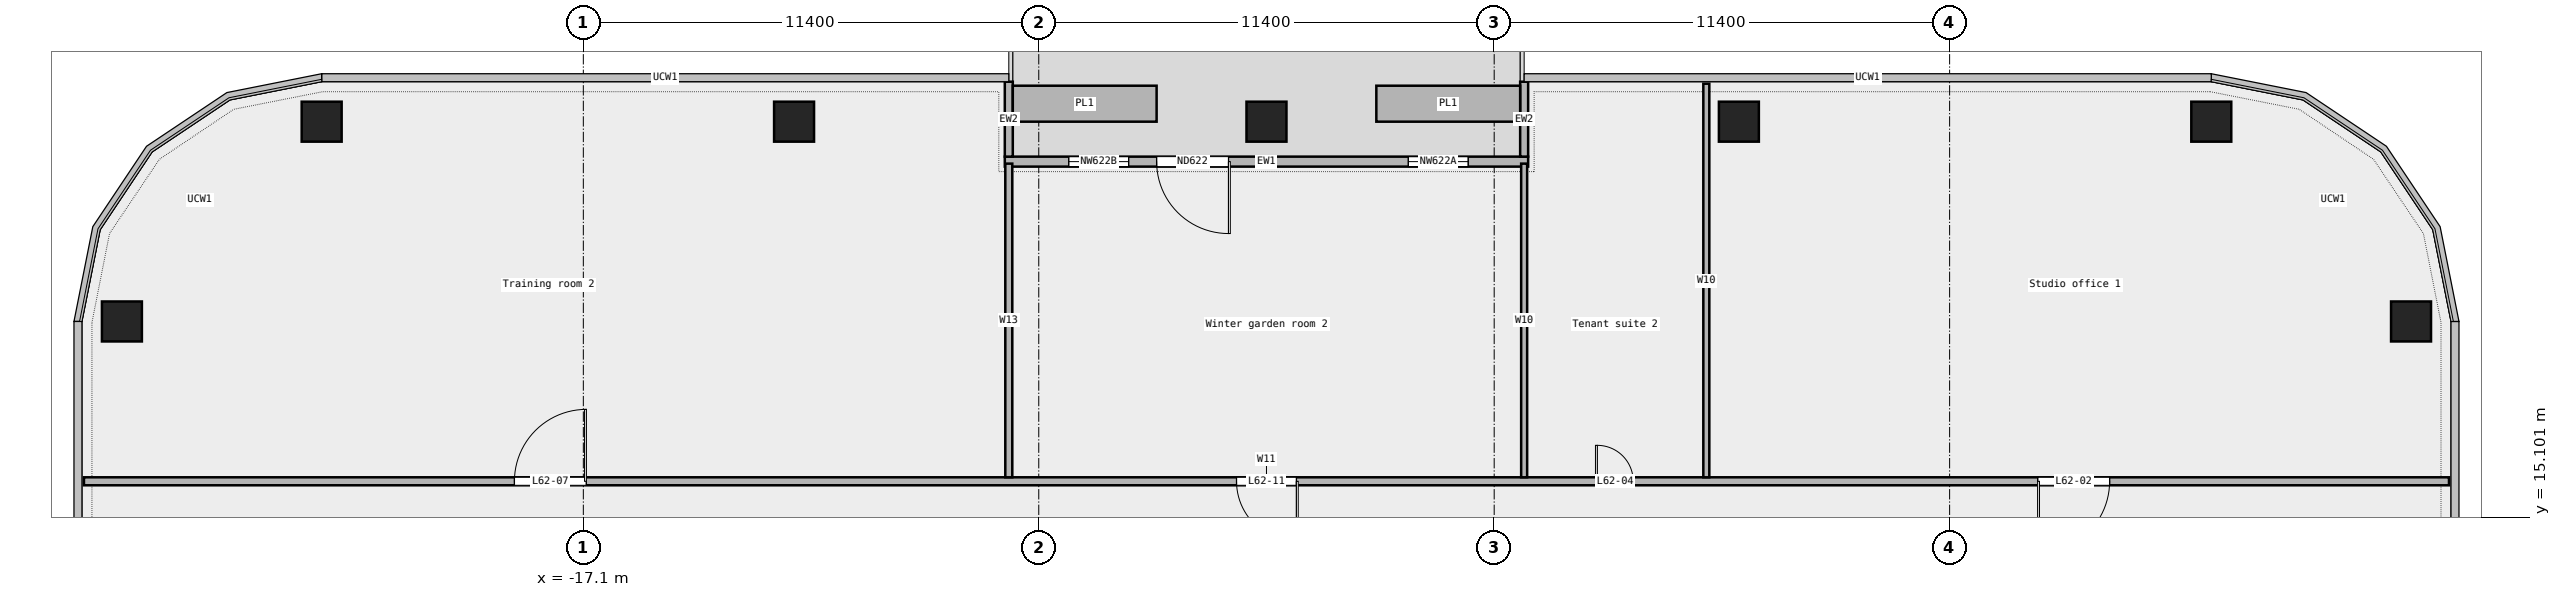
"""IFC4 building model, lengths in metres.
Left out: names, types, materials, properties, quantities, classifications, styles, units other than length and angle.
Written with IfcOpenShell. Run it as: python <this file> out.ifc"""

import sys

from ifc_helpers import new_model, si_unit, direction, frame, frame_2d, origin, origin_2d, place, context, subcontext, project, spatial, rectangle, extrude, element, fill, save


model = new_model("IFC4")
c1 = context("Model", 3, precision=1e-05, world=origin(), true_north=direction((0.0, 1.0)))
c2 = subcontext(c1, "Body", "Model", "MODEL_VIEW")
j1 = project(units=[si_unit("LENGTHUNIT", "METRE"), si_unit("PLANEANGLEUNIT", "RADIAN")], contexts=[c1])
p1 = place(None, origin())
s1 = spatial("IfcSite", under=j1, at=p1, CompositionType="ELEMENT")
p2 = place(p1, origin())
s2 = spatial("IfcBuilding", under=s1, at=p2, CompositionType="ELEMENT")
p3 = place(p2, frame((0.0, 0.0, 287.4)))
s3 = spatial("IfcBuildingStorey", under=s2, at=p3, CompositionType="ELEMENT", Elevation=287.4)
for number, where, z_axis, x_axis in (
    (1, (28.65, 20.0, 0.0), (0.0, 0.0, 1.0), (1.0, 0.0, 0.0)),
    (2, (23.65, 25.0, 0.0), (0.0, 0.0, 1.0), (1.0, 0.0, 0.0)),
    (3, (11.825, 25.0, 0.0), (0.0, 0.0, 1.0), (1.0, 0.0, 0.0)),
    (4, (0.0, 25.0, 0.0), (0.0, 0.0, 1.0), (1.0, 0.0, 0.0)),
    (5, (-11.825, 25.0, 0.0), (0.0, 0.0, 1.0), (1.0, 0.0, 0.0)),
    (6, (-23.65, 25.0, 0.0), (0.0, 0.0, 1.0), (1.0, 0.0, 0.0)),
    (7, (-28.65, 20.0, 0.0), (0.0, 0.0, 1.0), (1.0, 0.0, 0.0)),
):
    element("IfcColumn", number, at=place(p3, frame(where, z_axis=z_axis, x_axis=x_axis)), inside=s3, PredefinedType="COLUMN", context=c2, shape_type="SweptSolid", body=[
        extrude(rectangle(XDim=1.0, YDim=1.0, at=origin_2d()), origin(), (0.0, 0.0, 1.0), 3.6),
    ])
p4 = place(p3, frame((6.55, 24.0, 0.0), z_axis=(0.0, 0.0, 1.0), x_axis=(-1.0, 0.0, 0.0)))
e8 = element("IfcWall", 8, at=p4, inside=s3, PredefinedType="STANDARD", context=c2, shape_type="SweptSolid", body=[
    extrude(rectangle(XDim=13.1, YDim=0.25, at=frame_2d((6.55, 0.0))), origin(), (0.0, 0.0, 1.0), 3.6),
])
p5 = place(p4, frame((1.5, 0.0, 0.45)))
e9 = element("IfcOpeningElement", 9, at=p5, cuts=e8, PredefinedType="OPENING", context=c2, shape_type="SweptSolid", body=[
    extrude(rectangle(XDim=1.5, YDim=2.4, at=frame_2d((0.75, 1.2))), frame((0.0, 0.137, 0.0), z_axis=(0.0, -1.0, 0.0), x_axis=(1.0, 0.0, 0.0)), (0.0, 0.0, 1.0), 0.274),
])
p6 = place(p4, frame((7.5, 0.0, 0.0)))
e10 = element("IfcOpeningElement", 10, at=p6, cuts=e8, PredefinedType="OPENING", context=c2, shape_type="SweptSolid", body=[
    extrude(rectangle(XDim=1.8, YDim=2.4, at=frame_2d((0.9, 1.2))), frame((0.0, 0.137, 0.0), z_axis=(0.0, -1.0, 0.0), x_axis=(1.0, 0.0, 0.0)), (0.0, 0.0, 1.0), 0.274),
])
p7 = place(p4, frame((10.0, 0.0, 0.45)))
e11 = element("IfcOpeningElement", 11, at=p7, cuts=e8, PredefinedType="OPENING", context=c2, shape_type="SweptSolid", body=[
    extrude(rectangle(XDim=1.5, YDim=2.4, at=frame_2d((0.75, 1.2))), frame((0.0, 0.137, 0.0), z_axis=(0.0, -1.0, 0.0), x_axis=(1.0, 0.0, 0.0)), (0.0, 0.0, 1.0), 0.274),
])
for number, where, z_axis, x_axis in (
    (12, (6.45, 26.0, 0.0), (0.0, 0.0, 1.0), (0.0, -1.0, 0.0)),
    (13, (-6.45, 26.0, 0.0), (0.0, 0.0, 1.0), (0.0, -1.0, 0.0)),
):
    element("IfcWall", number, at=place(p3, frame(where, z_axis=z_axis, x_axis=x_axis)), inside=s3, PredefinedType="STANDARD", context=c2, shape_type="SweptSolid", body=[
        extrude(rectangle(XDim=1.875, YDim=0.2, at=frame_2d((0.938, 0.0))), origin(), (0.0, 0.0, 1.0), 3.6),
    ])
for number, where, z_axis, x_axis in (
    (14, (6.35, 25.45, 0.0), (0.0, 0.0, 1.0), (-1.0, 0.0, 0.0)),
    (15, (-2.75, 25.45, 0.0), (0.0, 0.0, 1.0), (-1.0, 0.0, 0.0)),
):
    element("IfcWall", number, at=place(p3, frame(where, z_axis=z_axis, x_axis=x_axis)), inside=s3, PredefinedType="STANDARD", context=c2, shape_type="SweptSolid", body=[
        extrude(rectangle(XDim=3.6, YDim=0.9, at=frame_2d((1.8, 0.0))), origin(), (0.0, 0.0, 1.0), 0.7),
    ])
p8 = place(p3, frame((-29.6, 16.0, 0.0), z_axis=(0.0, 0.0, 1.0), x_axis=(1.0, 0.0, 0.0)))
e16 = element("IfcWall", 16, at=p8, inside=s3, PredefinedType="PARTITIONING", context=c2, shape_type="SweptSolid", body=[
    extrude(rectangle(XDim=59.2, YDim=0.2, at=frame_2d((29.6, 0.0))), origin(), (0.0, 0.0, 1.0), 3.6),
])
p9 = place(p8, frame((48.905, 0.0, 0.0)))
e17 = element("IfcOpeningElement", 17, at=p9, cuts=e16, PredefinedType="OPENING", context=c2, shape_type="SweptSolid", body=[
    extrude(rectangle(XDim=1.8, YDim=2.1, at=frame_2d((0.9, 1.05))), frame((0.0, 0.112, 0.0), z_axis=(0.0, -1.0, 0.0), x_axis=(1.0, 0.0, 0.0)), (0.0, 0.0, 1.0), 0.224),
])
p10 = place(p8, frame((37.88, 0.0, 0.0)))
e18 = element("IfcOpeningElement", 18, at=p10, cuts=e16, PredefinedType="OPENING", context=c2, shape_type="SweptSolid", body=[
    extrude(rectangle(XDim=0.9, YDim=2.1, at=frame_2d((0.45, 1.05))), frame((0.0, 0.112, 0.0), z_axis=(0.0, -1.0, 0.0), x_axis=(1.0, 0.0, 0.0)), (0.0, 0.0, 1.0), 0.224),
])
p11 = place(p8, frame((10.775, 0.0, 0.0)))
e19 = element("IfcOpeningElement", 19, at=p11, cuts=e16, PredefinedType="OPENING", context=c2, shape_type="SweptSolid", body=[
    extrude(rectangle(XDim=1.8, YDim=2.1, at=frame_2d((0.9, 1.05))), frame((0.0, 0.112, 0.0), z_axis=(0.0, -1.0, 0.0), x_axis=(1.0, 0.0, 0.0)), (0.0, 0.0, 1.0), 0.224),
])
p12 = place(p8, frame((28.85, 0.0, 0.0)))
e20 = element("IfcOpeningElement", 20, at=p12, cuts=e16, PredefinedType="OPENING", context=c2, shape_type="SweptSolid", body=[
    extrude(rectangle(XDim=1.5, YDim=2.1, at=frame_2d((0.75, 1.05))), frame((0.0, 0.112, 0.0), z_axis=(0.0, -1.0, 0.0), x_axis=(1.0, 0.0, 0.0)), (0.0, 0.0, 1.0), 0.224),
])
p13 = place(p3, frame((-6.45, 16.1, 0.0), z_axis=(0.0, 0.0, 1.0), x_axis=(0.0, 1.0, 0.0)))
e21 = element("IfcWall", 21, at=p13, inside=s3, PredefinedType="PARTITIONING", context=c2, shape_type="SweptSolid", body=[
    extrude(rectangle(XDim=7.85, YDim=0.175, at=frame_2d((3.925, 0.0))), origin(), (0.0, 0.0, 1.0), 3.6),
])
p14 = place(p3, frame((6.45, 16.1, 0.0), z_axis=(0.0, 0.0, 1.0), x_axis=(0.0, 1.0, 0.0)))
e22 = element("IfcWall", 22, at=p14, inside=s3, PredefinedType="PARTITIONING", context=c2, shape_type="SweptSolid", body=[
    extrude(rectangle(XDim=7.85, YDim=0.15, at=frame_2d((3.925, 0.0))), origin(), (0.0, 0.0, 1.0), 3.6),
])
p15 = place(p3, frame((11.01, 16.1, 0.0), z_axis=(0.0, 0.0, 1.0), x_axis=(0.0, 1.0, 0.0)))
e23 = element("IfcWall", 23, at=p15, inside=s3, PredefinedType="PARTITIONING", context=c2, shape_type="SweptSolid", body=[
    extrude(rectangle(XDim=9.85, YDim=0.15, at=frame_2d((4.925, 0.0))), origin(), (0.0, 0.0, 1.0), 3.6),
])
p16 = place(p5, origin())
e24 = element("IfcWindow", 24, at=p16, inside=s3, PartitioningType="SINGLE_PANEL", PredefinedType="WINDOW", context=c2, shape_type="SweptSolid", body=[
    extrude(rectangle(XDim=1.5, YDim=2.4, at=frame_2d((0.75, 1.2))), frame((0.0, 0.03, 0.0), z_axis=(0.0, -1.0, 0.0), x_axis=(1.0, 0.0, 0.0)), (0.0, 0.0, 1.0), 0.06),
])
fill(e9, e24)
p17 = place(p6, origin())
e25 = element("IfcDoor", 25, at=p17, inside=s3, OperationType="DOUBLE_DOOR_SINGLE_SWING", PredefinedType="DOOR", context=c2, shape_type="SweptSolid", body=[
    extrude(rectangle(XDim=1.8, YDim=2.4, at=frame_2d((0.9, 1.2))), frame((0.0, 0.025, 0.0), z_axis=(0.0, -1.0, 0.0), x_axis=(1.0, 0.0, 0.0)), (0.0, 0.0, 1.0), 0.05),
])
fill(e10, e25)
p18 = place(p7, origin())
e26 = element("IfcWindow", 26, at=p18, inside=s3, PartitioningType="SINGLE_PANEL", PredefinedType="WINDOW", context=c2, shape_type="SweptSolid", body=[
    extrude(rectangle(XDim=1.5, YDim=2.4, at=frame_2d((0.75, 1.2))), frame((0.0, 0.03, 0.0), z_axis=(0.0, -1.0, 0.0), x_axis=(1.0, 0.0, 0.0)), (0.0, 0.0, 1.0), 0.06),
])
fill(e11, e26)
p19 = place(p9, origin())
e27 = element("IfcDoor", 27, at=p19, inside=s3, OperationType="DOUBLE_DOOR_SINGLE_SWING", PredefinedType="DOOR", context=c2, shape_type="SweptSolid", body=[
    extrude(rectangle(XDim=1.8, YDim=2.1, at=frame_2d((0.9, 1.05))), frame((0.0, 0.025, 0.0), z_axis=(0.0, -1.0, 0.0), x_axis=(1.0, 0.0, 0.0)), (0.0, 0.0, 1.0), 0.05),
])
fill(e17, e27)
p20 = place(p10, origin())
e28 = element("IfcDoor", 28, at=p20, inside=s3, OperationType="SINGLE_SWING_LEFT", PredefinedType="DOOR", context=c2, shape_type="SweptSolid", body=[
    extrude(rectangle(XDim=0.9, YDim=2.1, at=frame_2d((0.45, 1.05))), frame((0.0, 0.025, 0.0), z_axis=(0.0, -1.0, 0.0), x_axis=(1.0, 0.0, 0.0)), (0.0, 0.0, 1.0), 0.05),
])
fill(e18, e28)
p21 = place(p11, origin())
e29 = element("IfcDoor", 29, at=p21, inside=s3, OperationType="DOUBLE_DOOR_SINGLE_SWING", PredefinedType="DOOR", context=c2, shape_type="SweptSolid", body=[
    extrude(rectangle(XDim=1.8, YDim=2.1, at=frame_2d((0.9, 1.05))), frame((0.0, 0.025, 0.0), z_axis=(0.0, -1.0, 0.0), x_axis=(1.0, 0.0, 0.0)), (0.0, 0.0, 1.0), 0.05),
])
fill(e19, e29)
p22 = place(p12, origin())
e30 = element("IfcDoor", 30, at=p22, inside=s3, OperationType="DOUBLE_DOOR_SINGLE_SWING", PredefinedType="DOOR", context=c2, shape_type="SweptSolid", body=[
    extrude(rectangle(XDim=1.5, YDim=2.1, at=frame_2d((0.75, 1.05))), frame((0.0, 0.025, 0.0), z_axis=(0.0, -1.0, 0.0), x_axis=(1.0, 0.0, 0.0)), (0.0, 0.0, 1.0), 0.05),
])
fill(e20, e30)
save(model, sys.argv[1])
